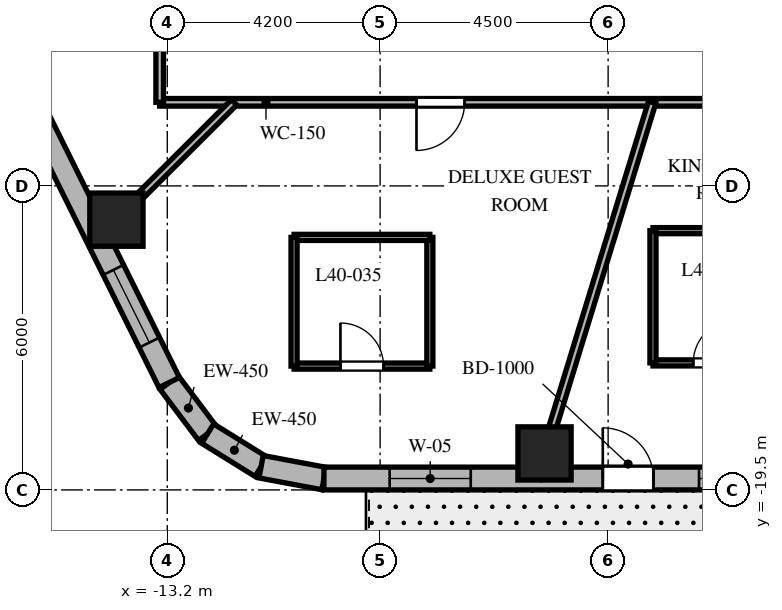
"""IFC4 building model, lengths in metres.
Left out: names, types, materials, properties, quantities, classifications, styles, units other than length and angle.
Written with IfcOpenShell. Run it as: python <this file> out.ifc"""

import sys

from ifc_helpers import new_model, si_unit, direction, frame, frame_2d, origin, origin_2d, place, context, subcontext, project, spatial, rectangle, extrude, element, fill, save


model = new_model("IFC4")
c1 = context("Model", 3, precision=1e-05, world=origin(), true_north=direction((0.0, 1.0)))
c2 = subcontext(c1, "Body", "Model", "MODEL_VIEW")
j1 = project(units=[si_unit("LENGTHUNIT", "METRE"), si_unit("PLANEANGLEUNIT", "RADIAN")], contexts=[c1])
p1 = place(None, origin())
s1 = spatial("IfcSite", under=j1, at=p1, CompositionType="ELEMENT")
p2 = place(p1, origin())
s2 = spatial("IfcBuilding", under=s1, at=p2, CompositionType="ELEMENT")
p3 = place(p2, frame((0.0, 0.0, 162.8)))
s3 = spatial("IfcBuildingStorey", under=s2, at=p3, CompositionType="ELEMENT", Elevation=162.8)
for number, where, z_axis, x_axis in (
    (1, (-5.755, -18.78, 0.0), (0.0, 0.0, 1.0), (1.0, 0.0, 0.0)),
    (2, (-14.204, -14.166, 0.0), (0.0, 0.0, 1.0), (1.0, 0.0, 0.0)),
):
    element("IfcColumn", number, at=place(p3, frame(where, z_axis=z_axis, x_axis=x_axis)), inside=s3, PredefinedType="COLUMN", context=c2, shape_type="SweptSolid", body=[
        extrude(rectangle(XDim=1.05, YDim=1.05, at=origin_2d()), origin(), (0.0, 0.0, 1.0), 3.7),
    ])
p4 = place(p3, frame((-13.162, -17.381, 0.0), z_axis=(0.0, 0.0, 1.0), x_axis=(0.601515770517, -0.798860925205, 0.0)))
e3 = element("IfcWall", 3, at=p4, inside=s3, PredefinedType="SOLIDWALL", context=c2, shape_type="SweptSolid", body=[
    extrude(rectangle(XDim=1.262, YDim=0.45, at=frame_2d((0.631, 0.0))), origin(), (0.0, 0.0, 1.0), 3.4),
])
p5 = place(p3, frame((-12.403, -18.389, 0.0), z_axis=(0.0, 0.0, 1.0), x_axis=(0.849795170926, -0.527113049991, 0.0)))
e4 = element("IfcWall", 4, at=p5, inside=s3, PredefinedType="SOLIDWALL", context=c2, shape_type="SweptSolid", body=[
    extrude(rectangle(XDim=1.241, YDim=0.45, at=frame_2d((0.62, 0.0))), origin(), (0.0, 0.0, 1.0), 3.4),
])
p6 = place(p3, frame((-11.349, -19.043, 0.0), z_axis=(0.0, 0.0, 1.0), x_axis=(0.982931267051, -0.183973161772, 0.0)))
e5 = element("IfcWall", 5, at=p6, inside=s3, PredefinedType="SOLIDWALL", context=c2, shape_type="SweptSolid", body=[
    extrude(rectangle(XDim=1.262, YDim=0.45, at=frame_2d((0.631, 0.0))), origin(), (0.0, 0.0, 1.0), 3.4),
])
p7 = place(p3, frame((-10.108, -19.275, 0.0), z_axis=(0.0, 0.0, 1.0), x_axis=(1.0, 0.0, 0.0)))
e6 = element("IfcWall", 6, at=p7, inside=s3, PredefinedType="SOLIDWALL", context=c2, shape_type="SweptSolid", body=[
    extrude(rectangle(XDim=21.829, YDim=0.45, at=frame_2d((10.915, 0.0))), origin(), (0.0, 0.0, 1.0), 3.4),
])
p8 = place(p7, frame((5.503, 0.0, 0.0)))
e7 = element("IfcOpeningElement", 7, at=p8, cuts=e6, PredefinedType="OPENING", context=c2, shape_type="SweptSolid", body=[
    extrude(rectangle(XDim=1.0, YDim=2.15, at=frame_2d((0.5, 1.075))), frame((0.0, 0.235, 0.0), z_axis=(0.0, -1.0, 0.0), x_axis=(1.0, 0.0, 0.0)), (0.0, 0.0, 1.0), 0.47),
])
p9 = place(p7, frame((1.297, 0.0, 0.8)))
e8 = element("IfcOpeningElement", 8, at=p9, cuts=e6, PredefinedType="OPENING", context=c2, shape_type="SweptSolid", body=[
    extrude(rectangle(XDim=1.6, YDim=1.75, at=frame_2d((0.8, 0.875))), frame((0.0, 0.235, 0.0), z_axis=(0.0, -1.0, 0.0), x_axis=(1.0, 0.0, 0.0)), (0.0, 0.0, 1.0), 0.47),
])
p10 = place(p7, frame((7.402, 0.0, 0.8)))
e9 = element("IfcOpeningElement", 9, at=p10, cuts=e6, PredefinedType="OPENING", context=c2, shape_type="SweptSolid", body=[
    extrude(rectangle(XDim=1.6, YDim=1.75, at=frame_2d((0.8, 0.875))), frame((0.0, 0.235, 0.0), z_axis=(0.0, -1.0, 0.0), x_axis=(1.0, 0.0, 0.0)), (0.0, 0.0, 1.0), 0.47),
])
p11 = place(p7, frame((12.684, 0.0, 0.8)))
e10 = element("IfcOpeningElement", 10, at=p11, cuts=e6, PredefinedType="OPENING", context=c2, shape_type="SweptSolid", body=[
    extrude(rectangle(XDim=1.6, YDim=1.75, at=frame_2d((0.8, 0.875))), frame((0.0, 0.235, 0.0), z_axis=(0.0, -1.0, 0.0), x_axis=(1.0, 0.0, 0.0)), (0.0, 0.0, 1.0), 0.47),
])
p12 = place(p7, frame((18.933, 0.0, 0.8)))
e11 = element("IfcOpeningElement", 11, at=p12, cuts=e6, PredefinedType="OPENING", context=c2, shape_type="SweptSolid", body=[
    extrude(rectangle(XDim=1.6, YDim=1.75, at=frame_2d((0.8, 0.875))), frame((0.0, 0.235, 0.0), z_axis=(0.0, -1.0, 0.0), x_axis=(1.0, 0.0, 0.0)), (0.0, 0.0, 1.0), 0.47),
])
p13 = place(p3, frame((-20.618, -2.344, 0.0), z_axis=(0.0, 0.0, 1.0), x_axis=(0.444243691097, -0.895905990002, 0.0)))
e12 = element("IfcWall", 12, at=p13, inside=s3, PredefinedType="SOLIDWALL", context=c2, shape_type="SweptSolid", body=[
    extrude(rectangle(XDim=16.784, YDim=0.45, at=frame_2d((8.392, 0.0))), origin(), (0.0, 0.0, 1.0), 3.4),
])
p14 = place(p13, frame((0.931, 0.0, 0.8)))
e13 = element("IfcOpeningElement", 13, at=p14, cuts=e12, PredefinedType="OPENING", context=c2, shape_type="SweptSolid", body=[
    extrude(rectangle(XDim=1.6, YDim=1.75, at=frame_2d((0.8, 0.875))), frame((0.0, 0.235, 0.0), z_axis=(0.0, -1.0, 0.0), x_axis=(1.0, 0.0, 0.0)), (0.0, 0.0, 1.0), 0.47),
])
p15 = place(p13, frame((7.642, 0.0, 0.8)))
e14 = element("IfcOpeningElement", 14, at=p15, cuts=e12, PredefinedType="OPENING", context=c2, shape_type="SweptSolid", body=[
    extrude(rectangle(XDim=1.6, YDim=1.75, at=frame_2d((0.8, 0.875))), frame((0.0, 0.235, 0.0), z_axis=(0.0, -1.0, 0.0), x_axis=(1.0, 0.0, 0.0)), (0.0, 0.0, 1.0), 0.47),
])
p16 = place(p13, frame((14.303, 0.0, 0.8)))
e15 = element("IfcOpeningElement", 15, at=p16, cuts=e12, PredefinedType="OPENING", context=c2, shape_type="SweptSolid", body=[
    extrude(rectangle(XDim=1.6, YDim=1.75, at=frame_2d((0.8, 0.875))), frame((0.0, 0.235, 0.0), z_axis=(0.0, -1.0, 0.0), x_axis=(1.0, 0.0, 0.0)), (0.0, 0.0, 1.0), 0.47),
])
p17 = place(p3, frame((13.35, -11.85, 0.0), z_axis=(0.0, 0.0, 1.0), x_axis=(-1.0, 0.0, 0.0)))
e16 = element("IfcWall", 16, at=p17, inside=s3, PredefinedType="PARTITIONING", context=c2, shape_type="SweptSolid", body=[
    extrude(rectangle(XDim=26.7, YDim=0.15, at=frame_2d((13.35, 0.0))), origin(), (0.0, 0.0, 1.0), 2.84),
])
p18 = place(p17, frame((20.682, 0.0, 0.0)))
e17 = element("IfcOpeningElement", 17, at=p18, cuts=e16, PredefinedType="OPENING", context=c2, shape_type="SweptSolid", body=[
    extrude(rectangle(XDim=0.95, YDim=2.03, at=frame_2d((0.475, 1.015))), frame((0.0, 0.085, 0.0), z_axis=(0.0, -1.0, 0.0), x_axis=(1.0, 0.0, 0.0)), (0.0, 0.0, 1.0), 0.17),
])
p19 = place(p17, frame((14.708, 0.0, 0.0)))
e18 = element("IfcOpeningElement", 18, at=p19, cuts=e16, PredefinedType="OPENING", context=c2, shape_type="SweptSolid", body=[
    extrude(rectangle(XDim=0.95, YDim=2.03, at=frame_2d((0.475, 1.015))), frame((0.0, 0.085, 0.0), z_axis=(0.0, -1.0, 0.0), x_axis=(1.0, 0.0, 0.0)), (0.0, 0.0, 1.0), 0.17),
])
p20 = place(p17, frame((10.553, 0.0, 0.0)))
e19 = element("IfcOpeningElement", 19, at=p20, cuts=e16, PredefinedType="OPENING", context=c2, shape_type="SweptSolid", body=[
    extrude(rectangle(XDim=0.95, YDim=2.03, at=frame_2d((0.475, 1.015))), frame((0.0, 0.085, 0.0), z_axis=(0.0, -1.0, 0.0), x_axis=(1.0, 0.0, 0.0)), (0.0, 0.0, 1.0), 0.17),
])
p21 = place(p17, frame((6.353, 0.0, 0.0)))
e20 = element("IfcOpeningElement", 20, at=p21, cuts=e16, PredefinedType="OPENING", context=c2, shape_type="SweptSolid", body=[
    extrude(rectangle(XDim=0.9, YDim=2.03, at=frame_2d((0.45, 1.015))), frame((0.0, 0.085, 0.0), z_axis=(0.0, -1.0, 0.0), x_axis=(1.0, 0.0, 0.0)), (0.0, 0.0, 1.0), 0.17),
])
p22 = place(p17, frame((2.15, 0.0, 0.0)))
e21 = element("IfcOpeningElement", 21, at=p22, cuts=e16, PredefinedType="OPENING", context=c2, shape_type="SweptSolid", body=[
    extrude(rectangle(XDim=0.9, YDim=2.03, at=frame_2d((0.45, 1.015))), frame((0.0, 0.085, 0.0), z_axis=(0.0, -1.0, 0.0), x_axis=(1.0, 0.0, 0.0)), (0.0, 0.0, 1.0), 0.17),
])
p23 = place(p3, frame((-13.35, -11.85, 0.0), z_axis=(0.0, 0.0, 1.0), x_axis=(0.0, 1.0, 0.0)))
e22 = element("IfcWall", 22, at=p23, inside=s3, PredefinedType="PARTITIONING", context=c2, shape_type="SweptSolid", body=[
    extrude(rectangle(XDim=23.7, YDim=0.15, at=frame_2d((11.85, 0.0))), origin(), (0.0, 0.0, 1.0), 2.84),
])
p24 = place(p23, frame((20.136, 0.0, 0.0)))
e23 = element("IfcOpeningElement", 23, at=p24, cuts=e22, PredefinedType="OPENING", context=c2, shape_type="SweptSolid", body=[
    extrude(rectangle(XDim=0.9, YDim=2.03, at=frame_2d((0.45, 1.015))), frame((0.0, 0.085, 0.0), z_axis=(0.0, -1.0, 0.0), x_axis=(1.0, 0.0, 0.0)), (0.0, 0.0, 1.0), 0.17),
])
p25 = place(p23, frame((15.551, 0.0, 0.0)))
e24 = element("IfcOpeningElement", 24, at=p25, cuts=e22, PredefinedType="OPENING", context=c2, shape_type="SweptSolid", body=[
    extrude(rectangle(XDim=0.9, YDim=2.03, at=frame_2d((0.45, 1.015))), frame((0.0, 0.085, 0.0), z_axis=(0.0, -1.0, 0.0), x_axis=(1.0, 0.0, 0.0)), (0.0, 0.0, 1.0), 0.17),
])
p26 = place(p23, frame((12.494, 0.0, 0.0)))
e25 = element("IfcOpeningElement", 25, at=p26, cuts=e22, PredefinedType="OPENING", context=c2, shape_type="SweptSolid", body=[
    extrude(rectangle(XDim=0.9, YDim=2.03, at=frame_2d((0.45, 1.015))), frame((0.0, 0.085, 0.0), z_axis=(0.0, -1.0, 0.0), x_axis=(1.0, 0.0, 0.0)), (0.0, 0.0, 1.0), 0.17),
])
p27 = place(p23, frame((9.424, 0.0, 0.0)))
e26 = element("IfcOpeningElement", 26, at=p27, cuts=e22, PredefinedType="OPENING", context=c2, shape_type="SweptSolid", body=[
    extrude(rectangle(XDim=0.95, YDim=2.03, at=frame_2d((0.475, 1.015))), frame((0.0, 0.085, 0.0), z_axis=(0.0, -1.0, 0.0), x_axis=(1.0, 0.0, 0.0)), (0.0, 0.0, 1.0), 0.17),
])
p28 = place(p23, frame((3.765, 0.0, 0.0)))
e27 = element("IfcOpeningElement", 27, at=p28, cuts=e22, PredefinedType="OPENING", context=c2, shape_type="SweptSolid", body=[
    extrude(rectangle(XDim=0.9, YDim=2.03, at=frame_2d((0.45, 1.015))), frame((0.0, 0.085, 0.0), z_axis=(0.0, -1.0, 0.0), x_axis=(1.0, 0.0, 0.0)), (0.0, 0.0, 1.0), 0.17),
])
p29 = place(p3, frame((-11.882, -11.85, 0.0), z_axis=(0.0, 0.0, 1.0), x_axis=(-0.708037373639, -0.706174962407, 0.0)))
e28 = element("IfcWall", 28, at=p29, inside=s3, PredefinedType="PARTITIONING", context=c2, shape_type="SweptSolid", body=[
    extrude(rectangle(XDim=3.802, YDim=0.15, at=frame_2d((1.901, 0.0))), origin(), (0.0, 0.0, 1.0), 2.64),
])
p30 = place(p3, frame((-3.631, -11.85, 0.0), z_axis=(0.0, 0.0, 1.0), x_axis=(-0.293007573338, -0.956110120209, 0.0)))
e29 = element("IfcWall", 29, at=p30, inside=s3, PredefinedType="PARTITIONING", context=c2, shape_type="SweptSolid", body=[
    extrude(rectangle(XDim=7.766, YDim=0.15, at=frame_2d((3.883, 0.0))), origin(), (0.0, 0.0, 1.0), 2.64),
])
p31 = place(p3, frame((-10.698, -17.056, 0.0), z_axis=(0.0, 0.0, 1.0), x_axis=(1.0, 0.0, 0.0)))
e30 = element("IfcWall", 30, at=p31, inside=s3, PredefinedType="PARTITIONING", context=c2, shape_type="SweptSolid", body=[
    extrude(rectangle(XDim=2.68, YDim=0.12, at=frame_2d((1.34, 0.0))), origin(), (0.0, 0.0, 1.0), 2.64),
])
p32 = place(p31, frame((0.915, 0.0, 0.0)))
e31 = element("IfcOpeningElement", 31, at=p32, cuts=e30, PredefinedType="OPENING", context=c2, shape_type="SweptSolid", body=[
    extrude(rectangle(XDim=0.85, YDim=2.03, at=frame_2d((0.425, 1.015))), frame((0.0, 0.07, 0.0), z_axis=(0.0, -1.0, 0.0), x_axis=(1.0, 0.0, 0.0)), (0.0, 0.0, 1.0), 0.14),
])
p33 = place(p3, frame((-8.018, -17.056, 0.0), z_axis=(0.0, 0.0, 1.0), x_axis=(0.0, 1.0, 0.0)))
e32 = element("IfcWall", 32, at=p33, inside=s3, PredefinedType="PARTITIONING", context=c2, shape_type="SweptSolid", body=[
    extrude(rectangle(XDim=2.54, YDim=0.12, at=frame_2d((1.27, 0.0))), origin(), (0.0, 0.0, 1.0), 3.4),
])
p34 = place(p3, frame((-8.018, -14.516, 0.0), z_axis=(0.0, 0.0, 1.0), x_axis=(-1.0, 0.0, 0.0)))
e33 = element("IfcWall", 33, at=p34, inside=s3, PredefinedType="PARTITIONING", context=c2, shape_type="SweptSolid", body=[
    extrude(rectangle(XDim=2.68, YDim=0.12, at=frame_2d((1.34, 0.0))), origin(), (0.0, 0.0, 1.0), 3.4),
])
p35 = place(p3, frame((-10.698, -14.516, 0.0), z_axis=(0.0, 0.0, 1.0), x_axis=(0.0, -1.0, 0.0)))
e34 = element("IfcWall", 34, at=p35, inside=s3, PredefinedType="PARTITIONING", context=c2, shape_type="SweptSolid", body=[
    extrude(rectangle(XDim=2.54, YDim=0.12, at=frame_2d((1.27, 0.0))), origin(), (0.0, 0.0, 1.0), 2.64),
])
p36 = place(p3, frame((-3.615, -16.993, 0.0), z_axis=(0.0, 0.0, 1.0), x_axis=(1.0, 0.0, 0.0)))
e35 = element("IfcWall", 35, at=p36, inside=s3, PredefinedType="PARTITIONING", context=c2, shape_type="SweptSolid", body=[
    extrude(rectangle(XDim=2.44, YDim=0.12, at=frame_2d((1.22, 0.0))), origin(), (0.0, 0.0, 1.0), 3.4),
])
p37 = place(p36, frame((0.795, 0.0, 0.0)))
e36 = element("IfcOpeningElement", 36, at=p37, cuts=e35, PredefinedType="OPENING", context=c2, shape_type="SweptSolid", body=[
    extrude(rectangle(XDim=0.85, YDim=2.03, at=frame_2d((0.425, 1.015))), frame((0.0, 0.07, 0.0), z_axis=(0.0, -1.0, 0.0), x_axis=(1.0, 0.0, 0.0)), (0.0, 0.0, 1.0), 0.14),
])
p38 = place(p3, frame((-1.175, -14.383, 0.0), z_axis=(0.0, 0.0, 1.0), x_axis=(-1.0, 0.0, 0.0)))
e37 = element("IfcWall", 37, at=p38, inside=s3, PredefinedType="PARTITIONING", context=c2, shape_type="SweptSolid", body=[
    extrude(rectangle(XDim=2.44, YDim=0.12, at=frame_2d((1.22, 0.0))), origin(), (0.0, 0.0, 1.0), 3.4),
])
p39 = place(p3, frame((-3.615, -14.383, 0.0), z_axis=(0.0, 0.0, 1.0), x_axis=(0.0, -1.0, 0.0)))
e38 = element("IfcWall", 38, at=p39, inside=s3, PredefinedType="PARTITIONING", context=c2, shape_type="SweptSolid", body=[
    extrude(rectangle(XDim=2.61, YDim=0.12, at=frame_2d((1.305, 0.0))), origin(), (0.0, 0.0, 1.0), 2.84),
])
p40 = place(p8, origin())
e39 = element("IfcDoor", 39, at=p40, inside=s3, OperationType="SINGLE_SWING_LEFT", PredefinedType="DOOR", context=c2, shape_type="SweptSolid", body=[
    extrude(rectangle(XDim=1.0, YDim=2.15, at=frame_2d((0.5, 1.075))), frame((0.0, 0.025, 0.0), z_axis=(0.0, -1.0, 0.0), x_axis=(1.0, 0.0, 0.0)), (0.0, 0.0, 1.0), 0.05),
])
fill(e7, e39)
p41 = place(p9, origin())
e40 = element("IfcWindow", 40, at=p41, inside=s3, PartitioningType="SINGLE_PANEL", PredefinedType="WINDOW", context=c2, shape_type="SweptSolid", body=[
    extrude(rectangle(XDim=1.6, YDim=1.75, at=frame_2d((0.8, 0.875))), frame((0.0, 0.03, 0.0), z_axis=(0.0, -1.0, 0.0), x_axis=(1.0, 0.0, 0.0)), (0.0, 0.0, 1.0), 0.06),
])
fill(e8, e40)
p42 = place(p10, origin())
e41 = element("IfcWindow", 41, at=p42, inside=s3, PartitioningType="SINGLE_PANEL", PredefinedType="WINDOW", context=c2, shape_type="SweptSolid", body=[
    extrude(rectangle(XDim=1.6, YDim=1.75, at=frame_2d((0.8, 0.875))), frame((0.0, 0.03, 0.0), z_axis=(0.0, -1.0, 0.0), x_axis=(1.0, 0.0, 0.0)), (0.0, 0.0, 1.0), 0.06),
])
fill(e9, e41)
p43 = place(p16, origin())
e42 = element("IfcWindow", 42, at=p43, inside=s3, PartitioningType="SINGLE_PANEL", PredefinedType="WINDOW", context=c2, shape_type="SweptSolid", body=[
    extrude(rectangle(XDim=1.6, YDim=1.75, at=frame_2d((0.8, 0.875))), frame((0.0, 0.03, 0.0), z_axis=(0.0, -1.0, 0.0), x_axis=(1.0, 0.0, 0.0)), (0.0, 0.0, 1.0), 0.06),
])
fill(e15, e42)
p44 = place(p18, origin())
e43 = element("IfcDoor", 43, at=p44, inside=s3, OperationType="SINGLE_SWING_RIGHT", PredefinedType="DOOR", context=c2, shape_type="SweptSolid", body=[
    extrude(rectangle(XDim=0.95, YDim=2.03, at=frame_2d((0.475, 1.015))), frame((0.0, 0.025, 0.0), z_axis=(0.0, -1.0, 0.0), x_axis=(1.0, 0.0, 0.0)), (0.0, 0.0, 1.0), 0.05),
])
fill(e17, e43)
p45 = place(p32, origin())
e44 = element("IfcDoor", 44, at=p45, inside=s3, OperationType="SINGLE_SWING_LEFT", PredefinedType="DOOR", context=c2, shape_type="SweptSolid", body=[
    extrude(rectangle(XDim=0.85, YDim=2.03, at=frame_2d((0.425, 1.015))), frame((0.0, 0.025, 0.0), z_axis=(0.0, -1.0, 0.0), x_axis=(1.0, 0.0, 0.0)), (0.0, 0.0, 1.0), 0.05),
])
fill(e31, e44)
p46 = place(p37, origin())
e45 = element("IfcDoor", 45, at=p46, inside=s3, OperationType="SINGLE_SWING_RIGHT", PredefinedType="DOOR", context=c2, shape_type="SweptSolid", body=[
    extrude(rectangle(XDim=0.85, YDim=2.03, at=frame_2d((0.425, 1.015))), frame((0.0, 0.025, 0.0), z_axis=(0.0, -1.0, 0.0), x_axis=(1.0, 0.0, 0.0)), (0.0, 0.0, 1.0), 0.05),
])
fill(e36, e45)
save(model, sys.argv[1])
